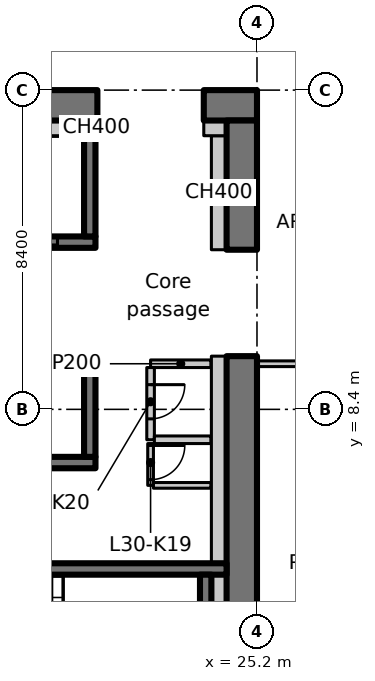
"""IFC4 building model, lengths in metres.
Left out: names, types, materials, properties, quantities, classifications, styles, units other than length and angle.
Written with IfcOpenShell. Run it as: python <this file> out.ifc"""

import sys

from ifc_helpers import new_model, si_unit, direction, frame, frame_2d, origin, place, context, subcontext, project, spatial, rectangle, extrude, element, fill, save


model = new_model("IFC4")
c1 = context("Model", 3, precision=1e-05, world=origin(), true_north=direction((0.0, 1.0)))
c2 = subcontext(c1, "Body", "Model", "MODEL_VIEW")
j1 = project(units=[si_unit("LENGTHUNIT", "METRE"), si_unit("PLANEANGLEUNIT", "RADIAN")], contexts=[c1])
p1 = place(None, origin())
s1 = spatial("IfcSite", under=j1, at=p1, CompositionType="ELEMENT")
p2 = place(p1, origin())
s2 = spatial("IfcBuilding", under=s1, at=p2, CompositionType="ELEMENT")
p3 = place(p2, frame((0.0, 0.0, 124.1)))
s3 = spatial("IfcBuildingStorey", under=s2, at=p3, CompositionType="ELEMENT", Elevation=124.1)
p4 = place(p3, frame((-1.1, 16.4, 0.0), z_axis=(0.0, 0.0, 1.0), x_axis=(1.0, 0.0, 0.0)))
e1 = element("IfcWall", 1, at=p4, inside=s3, PredefinedType="SHEAR", context=c2, shape_type="SweptSolid", body=[
    extrude(rectangle(XDim=22.1, YDim=0.8, at=frame_2d((11.05, 0.0))), origin(), (0.0, 0.0, 1.0), 3.35),
])
p5 = place(p4, frame((3.15, 0.0, 0.0)))
e2 = element("IfcOpeningElement", 2, at=p5, cuts=e1, PredefinedType="OPENING", context=c2, shape_type="SweptSolid", body=[
    extrude(rectangle(XDim=1.1, YDim=2.3, at=frame_2d((0.55, 1.15))), frame((0.0, 0.41, 0.0), z_axis=(0.0, -1.0, 0.0), x_axis=(1.0, 0.0, 0.0)), (0.0, 0.0, 1.0), 0.82),
])
p6 = place(p3, frame((23.8, 16.4, 0.0), z_axis=(0.0, 0.0, 1.0), x_axis=(1.0, 0.0, 0.0)))
e3 = element("IfcWall", 3, at=p6, inside=s3, PredefinedType="SHEAR", context=c2, shape_type="SweptSolid", body=[
    extrude(rectangle(XDim=1.4, YDim=0.8, at=frame_2d((0.7, 0.0))), origin(), (0.0, 0.0, 1.0), 3.35),
])
p7 = place(p3, frame((24.8, 0.8, 0.0), z_axis=(0.0, 0.0, 1.0), x_axis=(0.0, 1.0, 0.0)))
e4 = element("IfcWall", 4, at=p7, inside=s3, PredefinedType="SHEAR", context=c2, shape_type="SweptSolid", body=[
    extrude(rectangle(XDim=9.0, YDim=0.8, at=frame_2d((4.5, 0.0))), origin(), (0.0, 0.0, 1.0), 3.35),
])
p8 = place(p3, frame((24.8, 12.6, 0.0), z_axis=(0.0, 0.0, 1.0), x_axis=(0.0, 1.0, 0.0)))
e5 = element("IfcWall", 5, at=p8, inside=s3, PredefinedType="SHEAR", context=c2, shape_type="SweptSolid", body=[
    extrude(rectangle(XDim=3.4, YDim=0.8, at=frame_2d((1.7, 0.0))), origin(), (0.0, 0.0, 1.0), 3.35),
])
p9 = place(p3, frame((24.2, 12.6, 0.0), z_axis=(0.0, 0.0, 1.0), x_axis=(0.0, 1.0, 0.0)))
e6 = element("IfcWall", 6, at=p9, inside=s3, PredefinedType="PARTITIONING", context=c2, shape_type="SweptSolid", body=[
    extrude(rectangle(XDim=3.0, YDim=0.4, at=frame_2d((1.5, 0.0))), origin(), (0.0, 0.0, 1.0), 3.35),
])
p10 = place(p3, frame((23.8, 15.8, 0.0), z_axis=(0.0, 0.0, 1.0), x_axis=(1.0, 0.0, 0.0)))
e7 = element("IfcWall", 7, at=p10, inside=s3, PredefinedType="PARTITIONING", context=c2, shape_type="SweptSolid", body=[
    extrude(rectangle(XDim=0.6, YDim=0.4, at=frame_2d((0.3, 0.0))), origin(), (0.0, 0.0, 1.0), 3.35),
])
p11 = place(p3, frame((0.8, 7.0, 0.0), z_axis=(0.0, 0.0, 1.0), x_axis=(1.0, 0.0, 0.0)))
e8 = element("IfcWall", 8, at=p11, inside=s3, PredefinedType="SHEAR", context=c2, shape_type="SweptSolid", body=[
    extrude(rectangle(XDim=20.15, YDim=0.3, at=frame_2d((10.075, 0.0))), origin(), (0.0, 0.0, 1.0), 3.35),
])
p12 = place(p3, frame((0.8, 9.6, 0.0), z_axis=(0.0, 0.0, 1.0), x_axis=(1.0, 0.0, 0.0)))
e9 = element("IfcWall", 9, at=p12, inside=s3, PredefinedType="SHEAR", context=c2, shape_type="SweptSolid", body=[
    extrude(rectangle(XDim=20.15, YDim=0.3, at=frame_2d((10.075, 0.0))), origin(), (0.0, 0.0, 1.0), 3.35),
])
p13 = place(p12, frame((1.25, 0.0, 0.0)))
e10 = element("IfcOpeningElement", 10, at=p13, cuts=e9, PredefinedType="OPENING", context=c2, shape_type="SweptSolid", body=[
    extrude(rectangle(XDim=1.1, YDim=2.3, at=frame_2d((0.55, 1.15))), frame((0.0, 0.16, 0.0), z_axis=(0.0, -1.0, 0.0), x_axis=(1.0, 0.0, 0.0)), (0.0, 0.0, 1.0), 0.32),
])
p14 = place(p12, frame((4.05, 0.0, 0.0)))
e11 = element("IfcOpeningElement", 11, at=p14, cuts=e9, PredefinedType="OPENING", context=c2, shape_type="SweptSolid", body=[
    extrude(rectangle(XDim=1.1, YDim=2.3, at=frame_2d((0.55, 1.15))), frame((0.0, 0.16, 0.0), z_axis=(0.0, -1.0, 0.0), x_axis=(1.0, 0.0, 0.0)), (0.0, 0.0, 1.0), 0.32),
])
p15 = place(p12, frame((6.85, 0.0, 0.0)))
e12 = element("IfcOpeningElement", 12, at=p15, cuts=e9, PredefinedType="OPENING", context=c2, shape_type="SweptSolid", body=[
    extrude(rectangle(XDim=1.1, YDim=2.3, at=frame_2d((0.55, 1.15))), frame((0.0, 0.16, 0.0), z_axis=(0.0, -1.0, 0.0), x_axis=(1.0, 0.0, 0.0)), (0.0, 0.0, 1.0), 0.32),
])
p16 = place(p12, frame((9.65, 0.0, 0.0)))
e13 = element("IfcOpeningElement", 13, at=p16, cuts=e9, PredefinedType="OPENING", context=c2, shape_type="SweptSolid", body=[
    extrude(rectangle(XDim=1.1, YDim=2.3, at=frame_2d((0.55, 1.15))), frame((0.0, 0.16, 0.0), z_axis=(0.0, -1.0, 0.0), x_axis=(1.0, 0.0, 0.0)), (0.0, 0.0, 1.0), 0.32),
])
p17 = place(p12, frame((12.45, 0.0, 0.0)))
e14 = element("IfcOpeningElement", 14, at=p17, cuts=e9, PredefinedType="OPENING", context=c2, shape_type="SweptSolid", body=[
    extrude(rectangle(XDim=1.1, YDim=2.3, at=frame_2d((0.55, 1.15))), frame((0.0, 0.16, 0.0), z_axis=(0.0, -1.0, 0.0), x_axis=(1.0, 0.0, 0.0)), (0.0, 0.0, 1.0), 0.32),
])
p18 = place(p12, frame((15.25, 0.0, 0.0)))
e15 = element("IfcOpeningElement", 15, at=p18, cuts=e9, PredefinedType="OPENING", context=c2, shape_type="SweptSolid", body=[
    extrude(rectangle(XDim=1.1, YDim=2.3, at=frame_2d((0.55, 1.15))), frame((0.0, 0.16, 0.0), z_axis=(0.0, -1.0, 0.0), x_axis=(1.0, 0.0, 0.0)), (0.0, 0.0, 1.0), 0.32),
])
p19 = place(p3, frame((20.8, 7.15, 0.0), z_axis=(0.0, 0.0, 1.0), x_axis=(0.0, 1.0, 0.0)))
e16 = element("IfcWall", 16, at=p19, inside=s3, PredefinedType="SHEAR", context=c2, shape_type="SweptSolid", body=[
    extrude(rectangle(XDim=2.3, YDim=0.3, at=frame_2d((1.15, 0.0))), origin(), (0.0, 0.0, 1.0), 3.35),
])
p20 = place(p3, frame((15.05, 12.8, 0.0), z_axis=(0.0, 0.0, 1.0), x_axis=(1.0, 0.0, 0.0)))
e17 = element("IfcWall", 17, at=p20, inside=s3, PredefinedType="SHEAR", context=c2, shape_type="SweptSolid", body=[
    extrude(rectangle(XDim=5.9, YDim=0.3, at=frame_2d((2.95, 0.0))), origin(), (0.0, 0.0, 1.0), 3.35),
])
p21 = place(p20, frame((3.8, 0.0, 0.0)))
e18 = element("IfcOpeningElement", 18, at=p21, cuts=e17, PredefinedType="OPENING", context=c2, shape_type="SweptSolid", body=[
    extrude(rectangle(XDim=1.1, YDim=2.3, at=frame_2d((0.55, 1.15))), frame((0.0, 0.16, 0.0), z_axis=(0.0, -1.0, 0.0), x_axis=(1.0, 0.0, 0.0)), (0.0, 0.0, 1.0), 0.32),
])
p22 = place(p3, frame((20.8, 12.95, 0.0), z_axis=(0.0, 0.0, 1.0), x_axis=(0.0, 1.0, 0.0)))
e19 = element("IfcWall", 19, at=p22, inside=s3, PredefinedType="SHEAR", context=c2, shape_type="SweptSolid", body=[
    extrude(rectangle(XDim=3.05, YDim=0.3, at=frame_2d((1.525, 0.0))), origin(), (0.0, 0.0, 1.0), 3.35),
])
p23 = place(p3, frame((15.8, 4.2, 0.0), z_axis=(0.0, 0.0, 1.0), x_axis=(1.0, 0.0, 0.0)))
e20 = element("IfcWall", 20, at=p23, inside=s3, PredefinedType="SHEAR", context=c2, shape_type="SweptSolid", body=[
    extrude(rectangle(XDim=8.6, YDim=0.3, at=frame_2d((4.3, 0.0))), origin(), (0.0, 0.0, 1.0), 3.35),
])
p24 = place(p23, frame((0.4, 0.0, 0.0)))
e21 = element("IfcOpeningElement", 21, at=p24, cuts=e20, PredefinedType="OPENING", context=c2, shape_type="SweptSolid", body=[
    extrude(rectangle(XDim=1.0, YDim=2.1, at=frame_2d((0.5, 1.05))), frame((0.0, 0.16, 0.0), z_axis=(0.0, -1.0, 0.0), x_axis=(1.0, 0.0, 0.0)), (0.0, 0.0, 1.0), 0.32),
])
p25 = place(p3, frame((23.85, 1.5, 0.0), z_axis=(0.0, 0.0, 1.0), x_axis=(0.0, 1.0, 0.0)))
e22 = element("IfcWall", 22, at=p25, inside=s3, PredefinedType="SHEAR", context=c2, shape_type="SweptSolid", body=[
    extrude(rectangle(XDim=2.55, YDim=0.3, at=frame_2d((1.275, 0.0))), origin(), (0.0, 0.0, 1.0), 3.35),
])
p26 = place(p3, frame((23.988, 9.6, 0.0), z_axis=(0.0, 0.0, 1.0), x_axis=(-1.0, 0.0, 0.0)))
e23 = element("IfcWall", 23, at=p26, inside=s3, PredefinedType="PARTITIONING", context=c2, shape_type="SweptSolid", body=[
    extrude(rectangle(XDim=1.588, YDim=0.2, at=frame_2d((0.794, 0.0))), origin(), (0.0, 0.0, 1.0), 3.35),
])
p27 = place(p3, frame((22.4, 9.5, 0.0), z_axis=(0.0, 0.0, 1.0), x_axis=(0.0, -1.0, 0.0)))
e24 = element("IfcWall", 24, at=p27, inside=s3, PredefinedType="PARTITIONING", context=c2, shape_type="SweptSolid", body=[
    extrude(rectangle(XDim=1.9, YDim=0.2, at=frame_2d((0.95, 0.0))), origin(), (0.0, 0.0, 1.0), 3.35),
])
p28 = place(p27, frame((0.45, 0.0, 0.0)))
e25 = element("IfcOpeningElement", 25, at=p28, cuts=e24, PredefinedType="OPENING", context=c2, shape_type="SweptSolid", body=[
    extrude(rectangle(XDim=0.9, YDim=2.1, at=frame_2d((0.45, 1.05))), frame((0.0, 0.11, 0.0), z_axis=(0.0, -1.0, 0.0), x_axis=(1.0, 0.0, 0.0)), (0.0, 0.0, 1.0), 0.22),
])
p29 = place(p3, frame((22.5, 7.6, 0.0), z_axis=(0.0, 0.0, 1.0), x_axis=(1.0, 0.0, 0.0)))
e26 = element("IfcWall", 26, at=p29, inside=s3, PredefinedType="PARTITIONING", context=c2, shape_type="SweptSolid", body=[
    extrude(rectangle(XDim=1.488, YDim=0.2, at=frame_2d((0.744, 0.0))), origin(), (0.0, 0.0, 1.0), 3.35),
])
p30 = place(p3, frame((22.4, 7.5, 0.0), z_axis=(0.0, 0.0, 1.0), x_axis=(0.0, -1.0, 0.0)))
e27 = element("IfcWall", 27, at=p30, inside=s3, PredefinedType="PARTITIONING", context=c2, shape_type="SweptSolid", body=[
    extrude(rectangle(XDim=1.1, YDim=0.15, at=frame_2d((0.55, 0.0))), origin(), (0.0, 0.0, 1.0), 3.35),
])
p31 = place(p30, frame((0.05, 0.0, 0.0)))
e28 = element("IfcOpeningElement", 28, at=p31, cuts=e27, PredefinedType="OPENING", context=c2, shape_type="SweptSolid", body=[
    extrude(rectangle(XDim=0.9, YDim=2.1, at=frame_2d((0.45, 1.05))), frame((0.0, 0.085, 0.0), z_axis=(0.0, -1.0, 0.0), x_axis=(1.0, 0.0, 0.0)), (0.0, 0.0, 1.0), 0.17),
])
p32 = place(p3, frame((22.475, 6.4, 0.0), z_axis=(0.0, 0.0, 1.0), x_axis=(1.0, 0.0, 0.0)))
e29 = element("IfcWall", 29, at=p32, inside=s3, PredefinedType="PARTITIONING", context=c2, shape_type="SweptSolid", body=[
    extrude(rectangle(XDim=1.513, YDim=0.15, at=frame_2d((0.756, 0.0))), origin(), (0.0, 0.0, 1.0), 3.35),
])
p33 = place(p3, frame((18.15, 15.8, 0.0), z_axis=(0.0, 0.0, 1.0), x_axis=(1.0, 0.0, 0.0)))
e30 = element("IfcWall", 30, at=p33, inside=s3, PredefinedType="PARTITIONING", context=c2, shape_type="SweptSolid", body=[
    extrude(rectangle(XDim=2.5, YDim=0.4, at=frame_2d((1.25, 0.0))), origin(), (0.0, 0.0, 1.0), 3.35),
])
p34 = place(p3, frame((20.95, 15.8, 0.0), z_axis=(0.0, 0.0, 1.0), x_axis=(1.0, 0.0, 0.0)))
e31 = element("IfcWall", 31, at=p34, inside=s3, PredefinedType="PARTITIONING", context=c2, shape_type="SweptSolid", body=[
    extrude(rectangle(XDim=0.05, YDim=0.4, at=frame_2d((0.025, 0.0))), origin(), (0.0, 0.0, 1.0), 3.35),
])
p35 = place(p3, frame((24.2, 1.5, 0.0), z_axis=(0.0, 0.0, 1.0), x_axis=(0.0, 1.0, 0.0)))
e32 = element("IfcWall", 32, at=p35, inside=s3, PredefinedType="PARTITIONING", context=c2, shape_type="SweptSolid", body=[
    extrude(rectangle(XDim=2.55, YDim=0.4, at=frame_2d((1.275, 0.0))), origin(), (0.0, 0.0, 1.0), 3.35),
])
p36 = place(p3, frame((24.2, 4.35, 0.0), z_axis=(0.0, 0.0, 1.0), x_axis=(0.0, 1.0, 0.0)))
e33 = element("IfcWall", 33, at=p36, inside=s3, PredefinedType="PARTITIONING", context=c2, shape_type="SweptSolid", body=[
    extrude(rectangle(XDim=5.45, YDim=0.4, at=frame_2d((2.725, 0.0))), origin(), (0.0, 0.0, 1.0), 3.35),
])
p37 = place(p3, frame((29.4, 9.6, 0.0), z_axis=(0.0, 0.0, 1.0), x_axis=(-1.0, 0.0, 0.0)))
e34 = element("IfcWall", 34, at=p37, inside=s3, PredefinedType="PARTITIONING", context=c2, shape_type="SweptSolid", body=[
    extrude(rectangle(XDim=4.2, YDim=0.15, at=frame_2d((2.1, 0.0))), origin(), (0.0, 0.0, 1.0), 3.33),
])
p38 = place(p37, frame((1.5, 0.0, 0.0)))
e35 = element("IfcOpeningElement", 35, at=p38, cuts=e34, PredefinedType="OPENING", context=c2, shape_type="SweptSolid", body=[
    extrude(rectangle(XDim=1.1, YDim=2.1, at=frame_2d((0.55, 1.05))), frame((0.0, 0.085, 0.0), z_axis=(0.0, -1.0, 0.0), x_axis=(1.0, 0.0, 0.0)), (0.0, 0.0, 1.0), 0.17),
])
p39 = place(p21, origin())
e36 = element("IfcDoor", 36, at=p39, inside=s3, OperationType="SLIDING_TO_LEFT", PredefinedType="DOOR", context=c2, shape_type="SweptSolid", body=[
    extrude(rectangle(XDim=1.1, YDim=2.3, at=frame_2d((0.55, 1.15))), frame((0.0, 0.025, 0.0), z_axis=(0.0, -1.0, 0.0), x_axis=(1.0, 0.0, 0.0)), (0.0, 0.0, 1.0), 0.05),
])
fill(e18, e36)
p40 = place(p31, origin())
e37 = element("IfcDoor", 37, at=p40, inside=s3, OperationType="SINGLE_SWING_RIGHT", PredefinedType="DOOR", context=c2, shape_type="SweptSolid", body=[
    extrude(rectangle(XDim=0.9, YDim=2.1, at=frame_2d((0.45, 1.05))), frame((0.0, 0.025, 0.0), z_axis=(0.0, -1.0, 0.0), x_axis=(1.0, 0.0, 0.0)), (0.0, 0.0, 1.0), 0.05),
])
fill(e28, e37)
p41 = place(p28, origin())
e38 = element("IfcDoor", 38, at=p41, inside=s3, OperationType="SINGLE_SWING_LEFT", PredefinedType="DOOR", context=c2, shape_type="SweptSolid", body=[
    extrude(rectangle(XDim=0.9, YDim=2.1, at=frame_2d((0.45, 1.05))), frame((0.0, 0.025, 0.0), z_axis=(0.0, -1.0, 0.0), x_axis=(1.0, 0.0, 0.0)), (0.0, 0.0, 1.0), 0.05),
])
fill(e25, e38)
save(model, sys.argv[1])
